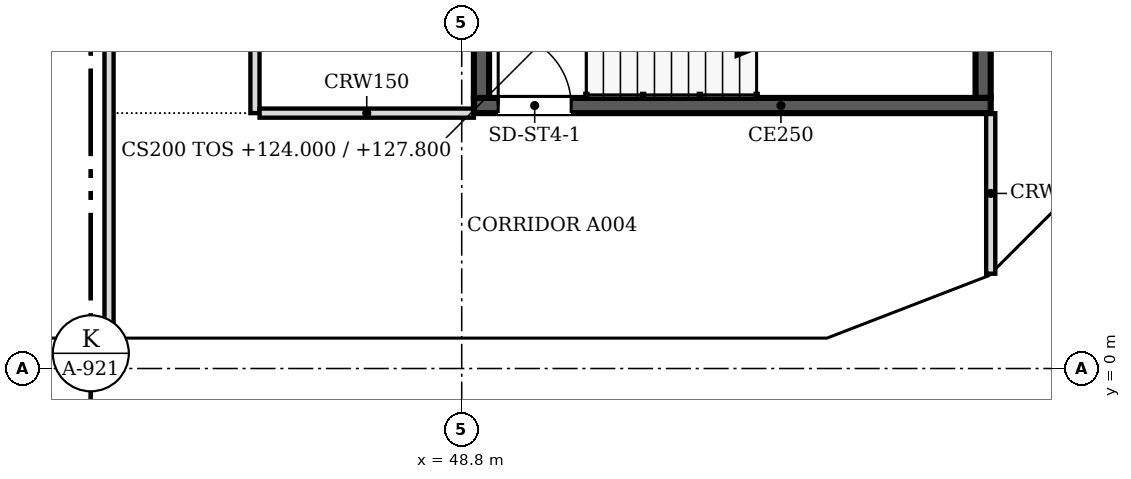
"""IFC4 building model, lengths in metres.
Left out: names, types, materials, properties, quantities, classifications, styles, units other than length and angle.
Written with IfcOpenShell. Run it as: python <this file> out.ifc"""

import sys

from ifc_helpers import new_model, si_unit, direction, frame, frame_2d, origin, place, context, subcontext, project, spatial, polyline, rectangle, outline, extrude, faceted_brep, source, transform, mapped, element, fill, save


model = new_model("IFC4")
c1 = context("Model", 3, precision=1e-05, world=origin(), true_north=direction((0.0, 1.0)))
c2 = subcontext(c1, "Body", "Model", "MODEL_VIEW")
j1 = project(units=[si_unit("LENGTHUNIT", "METRE"), si_unit("PLANEANGLEUNIT", "RADIAN")], contexts=[c1])
p1 = place(None, origin())
s1 = spatial("IfcSite", under=j1, at=p1, CompositionType="ELEMENT")
p2 = place(p1, origin())
s2 = spatial("IfcBuilding", under=s1, at=p2, CompositionType="ELEMENT")
p3 = place(p2, frame((0.0, 0.0, 124.0)))
s3 = spatial("IfcBuildingStorey", under=s2, at=p3, CompositionType="ELEMENT", Elevation=124.0)
m1 = source(origin(), c2, "Body", "Brep", [
    faceted_brep([(3.05, -0.25, 0.0), (6.1, -0.25, 3.8), (6.1, -0.25, 3.8), (3.05, -0.25, 7.6), (0.0, -0.25, 3.8), (0.0, 0.25, 3.8), (3.05, 0.25, 7.6), (6.1, 0.25, 3.8), (6.1, 0.25, 3.8), (3.05, 0.25, 0.0)], [[[0, 1, 2, 3, 4]], [[5, 6, 7, 8, 9]], [[9, 8, 1, 0]], [[7, 6, 3, 2]], [[6, 5, 4, 3]], [[5, 9, 0, 4]], [[1, 8, 7, 2]]]),
])
p4 = place(p3, frame((36.6, 0.25, -3.8), z_axis=(0.0, 0.0, 1.0), x_axis=(1.0, 0.0, 0.0)))
e1 = element("IfcWall", 1, at=p4, inside=s3, PredefinedType="SOLIDWALL", context=c2, shape_type="MappedRepresentation", body=[
    mapped(m1, transform((0.0, 0.0, 0.0), scale=1.0)),
])
m2 = source(origin(), c2, "Body", "SweptSolid", [
    extrude(outline(polyline([(3.05, 0.399), (5.78, 3.8), (3.05, 7.201), (0.321, 3.8), (3.05, 0.399)])), frame((0.0, 0.26, 0.0), z_axis=(0.0, -1.0, 0.0), x_axis=(1.0, 0.0, 0.0)), (0.0, 0.0, 1.0), 0.52),
])
p5 = place(p4, origin())
e2 = element("IfcOpeningElement", 2, at=p5, cuts=e1, PredefinedType="OPENING", context=c2, shape_type="MappedRepresentation", body=[
    mapped(m2, transform((0.0, 0.0, 0.0), scale=1.0)),
])
m3 = source(origin(), c2, "Body", "SweptSolid", [
    extrude(outline(polyline([(3.05, 0.0), (6.1, 3.8), (3.05, 7.6), (0.0, 3.8), (3.05, 0.0)])), frame((0.0, 0.25, 0.0), z_axis=(0.0, -1.0, 0.0), x_axis=(1.0, 0.0, 0.0)), (0.0, 0.0, 1.0), 0.5),
])
p6 = place(p3, frame((42.7, 0.25, -3.8), z_axis=(0.0, 0.0, 1.0), x_axis=(1.0, 0.0, 0.0)))
e3 = element("IfcWall", 3, at=p6, inside=s3, PredefinedType="SOLIDWALL", context=c2, shape_type="MappedRepresentation", body=[
    mapped(m3, transform((0.0, 0.0, 0.0), scale=1.0)),
])
p7 = place(p6, origin())
e4 = element("IfcOpeningElement", 4, at=p7, cuts=e3, PredefinedType="OPENING", context=c2, shape_type="MappedRepresentation", body=[
    mapped(m2, transform((0.0, 0.0, 0.0), scale=1.0)),
])
m4 = source(origin(), c2, "Body", "Brep", [
    faceted_brep([(3.05, -0.25, 0.0), (6.053, -0.25, 3.8), (3.05, -0.25, 7.6), (0.0, -0.25, 3.8), (0.0, 0.25, 3.8), (3.05, 0.25, 7.6), (6.007, 0.25, 3.859), (6.007, 0.25, 3.741), (3.05, 0.25, 0.0), (6.053, 0.0, 3.8)], [[[0, 1, 2, 3]], [[4, 5, 6, 7, 8]], [[8, 7, 9, 1, 0]], [[6, 5, 2, 1, 9]], [[5, 4, 3, 2]], [[4, 8, 0, 3]], [[9, 7, 6]]]),
])
p8 = place(p3, frame((48.8, 0.25, -3.8), z_axis=(0.0, 0.0, 1.0), x_axis=(1.0, 0.0, 0.0)))
e5 = element("IfcWall", 5, at=p8, inside=s3, PredefinedType="SOLIDWALL", context=c2, shape_type="MappedRepresentation", body=[
    mapped(m4, transform((0.0, 0.0, 0.0), scale=1.0)),
])
m5 = source(origin(), c2, "Body", "SweptSolid", [
    extrude(outline(polyline([(3.049, 0.401), (5.735, 3.8), (3.049, 7.199), (0.321, 3.8), (3.049, 0.401)])), frame((0.0, 0.26, 0.0), z_axis=(0.0, -1.0, 0.0), x_axis=(1.0, 0.0, 0.0)), (0.0, 0.0, 1.0), 0.52),
])
p9 = place(p8, origin())
e6 = element("IfcOpeningElement", 6, at=p9, cuts=e5, PredefinedType="OPENING", context=c2, shape_type="MappedRepresentation", body=[
    mapped(m5, transform((0.0, 0.0, 0.0), scale=1.0)),
])
m6 = source(origin(), c2, "Body", "Brep", [
    faceted_brep([(2.95, -0.25, 0.0), (3.003, -0.25, 0.068), (3.003, -0.25, 7.532), (2.95, -0.25, 7.6), (0.0, -0.25, 3.8), (0.047, 0.25, 3.86), (2.898, 0.25, 7.532), (2.898, 0.25, 0.068), (0.047, 0.25, 3.74), (2.95, 0.0, 0.0), (2.95, 0.0, 7.6), (0.0, 0.0, 3.8)], [[[0, 1, 2, 3, 4]], [[5, 6, 7, 8]], [[1, 0, 9]], [[10, 3, 2]], [[6, 5, 11, 4, 3, 10]], [[8, 7, 9, 0, 4, 11]], [[8, 11, 5]], [[1, 9, 7, 6, 10, 2]]]),
])
p10 = place(p3, frame((54.854, 0.25, -3.8), z_axis=(0.0, 0.0, 1.0), x_axis=(0.932970071518, 0.359953949349, 0.0)))
e7 = element("IfcWall", 7, at=p10, inside=s3, PredefinedType="SOLIDWALL", context=c2, shape_type="MappedRepresentation", body=[
    mapped(m6, transform((0.0, 0.0, 0.0), scale=1.0)),
])
m7 = source(origin(), c2, "Body", "SweptSolid", [
    extrude(outline(polyline([(2.75, 6.935), (0.316, 3.8), (2.75, 0.665), (2.75, 6.935)])), frame((0.0, 0.26, 0.0), z_axis=(0.0, -1.0, 0.0), x_axis=(1.0, 0.0, 0.0)), (0.0, 0.0, 1.0), 0.52),
])
p11 = place(p10, origin())
e8 = element("IfcOpeningElement", 8, at=p11, cuts=e7, PredefinedType="OPENING", context=c2, shape_type="MappedRepresentation", body=[
    mapped(m7, transform((0.0, 0.0, 0.0), scale=1.0)),
])
m8 = source(origin(), c2, "Body", "Brep", [
    faceted_brep([(0.053, -0.25, 0.0), (2.997, -0.25, 3.8), (0.053, -0.25, 7.6), (0.0, -0.25, 7.532), (0.0, -0.25, 0.068), (0.106, 0.25, 7.532), (2.944, 0.25, 3.868), (2.944, 0.25, 3.732), (0.106, 0.25, 0.068), (2.997, 0.0, 3.8), (0.053, 0.0, 0.0), (0.053, 0.0, 7.6)], [[[0, 1, 2, 3, 4]], [[5, 6, 7, 8]], [[8, 7, 9, 1, 0, 10]], [[6, 5, 11, 2, 1, 9]], [[3, 2, 11]], [[10, 0, 4]], [[8, 10, 4, 3, 11, 5]], [[9, 7, 6]]]),
])
p12 = place(p3, frame((57.569, 1.274, -3.8), z_axis=(0.0, 0.0, 1.0), x_axis=(0.707066050402, 0.707147509625, 0.0)))
e9 = element("IfcWall", 9, at=p12, inside=s3, PredefinedType="SOLIDWALL", context=c2, shape_type="MappedRepresentation", body=[
    mapped(m8, transform((0.0, 0.0, 0.0), scale=1.0)),
])
m9 = source(origin(), c2, "Body", "SweptSolid", [
    extrude(outline(polyline([(0.253, 0.666), (2.681, 3.8), (0.253, 6.934), (0.253, 0.666)])), frame((0.0, 0.26, 0.0), z_axis=(0.0, -1.0, 0.0), x_axis=(1.0, 0.0, 0.0)), (0.0, 0.0, 1.0), 0.52),
])
p13 = place(p12, origin())
e10 = element("IfcOpeningElement", 10, at=p13, cuts=e9, PredefinedType="OPENING", context=c2, shape_type="MappedRepresentation", body=[
    mapped(m9, transform((0.0, 0.0, 0.0), scale=1.0)),
])
p14 = place(p2, frame((0.0, 0.0, 127.8)))
s4 = spatial("IfcBuildingStorey", under=s2, at=p14, CompositionType="ELEMENT", Elevation=127.8)
p15 = place(p14, frame((39.65, 0.25, -3.8), z_axis=(0.0, 0.0, 1.0), x_axis=(1.0, 0.0, 0.0)))
e11 = element("IfcWall", 11, at=p15, inside=s4, PredefinedType="SOLIDWALL", context=c2, shape_type="MappedRepresentation", body=[
    mapped(m3, transform((0.0, 0.0, 0.0), scale=1.0)),
])
p16 = place(p15, origin())
e12 = element("IfcOpeningElement", 12, at=p16, cuts=e11, PredefinedType="OPENING", context=c2, shape_type="MappedRepresentation", body=[
    mapped(m2, transform((0.0, 0.0, 0.0), scale=1.0)),
])
p17 = place(p14, frame((45.75, 0.25, -3.8), z_axis=(0.0, 0.0, 1.0), x_axis=(1.0, 0.0, 0.0)))
e13 = element("IfcWall", 13, at=p17, inside=s4, PredefinedType="SOLIDWALL", context=c2, shape_type="MappedRepresentation", body=[
    mapped(m3, transform((0.0, 0.0, 0.0), scale=1.0)),
])
p18 = place(p17, origin())
e14 = element("IfcOpeningElement", 14, at=p18, cuts=e13, PredefinedType="OPENING", context=c2, shape_type="MappedRepresentation", body=[
    mapped(m2, transform((0.0, 0.0, 0.0), scale=1.0)),
])
m10 = source(origin(), c2, "Body", "Brep", [
    faceted_brep([(3.003, -0.25, 0.0), (3.05, -0.25, 0.06), (3.05, -0.25, 7.54), (3.003, -0.25, 7.6), (0.0, -0.25, 3.8), (0.0, 0.25, 3.8), (2.957, 0.25, 7.541), (2.957, 0.25, 0.059), (3.003, 0.0, 0.0), (3.003, 0.0, 7.6)], [[[0, 1, 2, 3, 4]], [[5, 6, 7]], [[1, 0, 8]], [[9, 3, 2]], [[6, 5, 4, 3, 9]], [[5, 7, 8, 0, 4]], [[1, 8, 7, 6, 9, 2]]]),
])
p19 = place(p14, frame((51.85, 0.25, -3.8), z_axis=(0.0, 0.0, 1.0), x_axis=(1.0, 0.0, 0.0)))
e15 = element("IfcWall", 15, at=p19, inside=s4, PredefinedType="SOLIDWALL", context=c2, shape_type="MappedRepresentation", body=[
    mapped(m10, transform((0.0, 0.0, 0.0), scale=1.0)),
])
m11 = source(origin(), c2, "Body", "SweptSolid", [
    extrude(outline(polyline([(2.803, 6.944), (0.319, 3.8), (2.803, 0.656), (2.803, 6.944)])), frame((0.0, 0.26, 0.0), z_axis=(0.0, -1.0, 0.0), x_axis=(1.0, 0.0, 0.0)), (0.0, 0.0, 1.0), 0.52),
])
p20 = place(p19, origin())
e16 = element("IfcOpeningElement", 16, at=p20, cuts=e15, PredefinedType="OPENING", context=c2, shape_type="MappedRepresentation", body=[
    mapped(m11, transform((0.0, 0.0, 0.0), scale=1.0)),
])
m12 = source(origin(), c2, "Body", "Brep", [
    faceted_brep([(0.047, -0.25, 0.0), (2.997, -0.25, 3.8), (0.047, -0.25, 7.6), (0.0, -0.25, 7.541), (0.0, -0.25, 0.059), (0.093, 0.25, 7.54), (2.944, 0.25, 3.868), (2.944, 0.25, 3.732), (0.093, 0.25, 0.06), (2.997, 0.0, 3.8), (0.047, 0.0, 0.0), (0.047, 0.0, 7.6)], [[[0, 1, 2, 3, 4]], [[5, 6, 7, 8]], [[8, 7, 9, 1, 0, 10]], [[6, 5, 11, 2, 1, 9]], [[3, 2, 11]], [[10, 0, 4]], [[8, 10, 4, 3, 11, 5]], [[9, 7, 6]]]),
])
p21 = place(p14, frame((54.81, 0.233, -3.8), z_axis=(0.0, 0.0, 1.0), x_axis=(0.932990326376, 0.359901446078, 0.0)))
e17 = element("IfcWall", 17, at=p21, inside=s4, PredefinedType="SOLIDWALL", context=c2, shape_type="MappedRepresentation", body=[
    mapped(m12, transform((0.0, 0.0, 0.0), scale=1.0)),
])
m13 = source(origin(), c2, "Body", "SweptSolid", [
    extrude(outline(polyline([(0.247, 0.665), (2.681, 3.8), (0.247, 6.935), (0.247, 0.665)])), frame((0.0, 0.26, 0.0), z_axis=(0.0, -1.0, 0.0), x_axis=(1.0, 0.0, 0.0)), (0.0, 0.0, 1.0), 0.52),
])
p22 = place(p21, origin())
e18 = element("IfcOpeningElement", 18, at=p22, cuts=e17, PredefinedType="OPENING", context=c2, shape_type="MappedRepresentation", body=[
    mapped(m13, transform((0.0, 0.0, 0.0), scale=1.0)),
])
m14 = source(origin(), c2, "Body", "Brep", [
    faceted_brep([(2.944, -0.25, 0.0), (2.997, -0.25, 0.068), (2.997, -0.25, 7.532), (2.944, -0.25, 7.6), (0.0, -0.25, 3.8), (0.053, 0.25, 3.868), (2.891, 0.25, 7.532), (2.891, 0.25, 0.068), (0.053, 0.25, 3.732), (2.944, 0.0, 0.0), (2.944, 0.0, 7.6), (0.0, 0.0, 3.8)], [[[0, 1, 2, 3, 4]], [[5, 6, 7, 8]], [[1, 0, 9]], [[10, 3, 2]], [[6, 5, 11, 4, 3, 10]], [[8, 7, 9, 0, 4, 11]], [[8, 11, 5]], [[1, 9, 7, 6, 10, 2]]]),
])
p23 = place(p14, frame((57.606, 1.312, -3.8), z_axis=(0.0, 0.0, 1.0), x_axis=(0.707147509625, 0.707066050402, 0.0)))
e19 = element("IfcWall", 19, at=p23, inside=s4, PredefinedType="SOLIDWALL", context=c2, shape_type="MappedRepresentation", body=[
    mapped(m14, transform((0.0, 0.0, 0.0), scale=1.0)),
])
m15 = source(origin(), c2, "Body", "SweptSolid", [
    extrude(outline(polyline([(2.744, 6.934), (0.316, 3.8), (2.744, 0.666), (2.744, 6.934)])), frame((0.0, 0.26, 0.0), z_axis=(0.0, -1.0, 0.0), x_axis=(1.0, 0.0, 0.0)), (0.0, 0.0, 1.0), 0.52),
])
p24 = place(p23, origin())
e20 = element("IfcOpeningElement", 20, at=p24, cuts=e19, PredefinedType="OPENING", context=c2, shape_type="MappedRepresentation", body=[
    mapped(m15, transform((0.0, 0.0, 0.0), scale=1.0)),
])
p25 = place(p3, frame((57.5, 4.325, 0.0), z_axis=(0.0, 0.0, 1.0), x_axis=(-1.0, 0.0, 0.0)))
e21 = element("IfcWall", 21, at=p25, inside=s3, PredefinedType="SOLIDWALL", context=c2, shape_type="SweptSolid", body=[
    extrude(rectangle(XDim=8.5, YDim=0.25, at=frame_2d((4.25, 0.0))), origin(), (0.0, 0.0, 1.0), 3.8),
])
m16 = source(origin(), c2, "Body", "SweptSolid", [
    extrude(rectangle(XDim=1.2, YDim=2.1, at=frame_2d((0.6, 1.05))), frame((0.0, 0.135, 0.0), z_axis=(0.0, -1.0, 0.0), x_axis=(1.0, 0.0, 0.0)), (0.0, 0.0, 1.0), 0.27),
])
p26 = place(p25, frame((6.9, 0.0, 0.0)))
e22 = element("IfcOpeningElement", 22, at=p26, cuts=e21, PredefinedType="OPENING", context=c2, shape_type="MappedRepresentation", body=[
    mapped(m16, transform((0.0, 0.0, 0.0), scale=1.0)),
])
for number, where, z_axis, x_axis in (
    (23, (49.125, 4.45, 0.0), (0.0, 0.0, 1.0), (0.0, 1.0, 0.0)),
    (24, (57.375, 7.85, 0.0), (0.0, 0.0, 1.0), (0.0, -1.0, 0.0)),
):
    element("IfcWall", number, at=place(p3, frame(where, z_axis=z_axis, x_axis=x_axis)), inside=s3, PredefinedType="SOLIDWALL", context=c2, shape_type="SweptSolid", body=[
        extrude(rectangle(XDim=3.4, YDim=0.25, at=frame_2d((1.7, 0.0))), origin(), (0.0, 0.0, 1.0), 3.8),
    ])
p27 = place(p3, frame((43.0, 0.5, 0.0), z_axis=(0.0, 0.0, 1.0), x_axis=(0.0, 1.0, 0.0)))
e25 = element("IfcWall", 25, at=p27, inside=s3, PredefinedType="PARTITIONING", context=c2, shape_type="SweptSolid", body=[
    extrude(rectangle(XDim=21.424, YDim=0.15, at=frame_2d((10.712, 0.0))), origin(), (0.0, 0.0, 1.0), 3.067),
])
m17 = source(origin(), c2, "Body", "SweptSolid", [
    extrude(rectangle(XDim=1.0, YDim=2.1, at=frame_2d((0.5, 1.05))), frame((0.0, 0.085, 0.0), z_axis=(0.0, -1.0, 0.0), x_axis=(1.0, 0.0, 0.0)), (0.0, 0.0, 1.0), 0.17),
])
p28 = place(p27, frame((16.601, 0.0, 0.0)))
e26 = element("IfcOpeningElement", 26, at=p28, cuts=e25, PredefinedType="OPENING", context=c2, shape_type="MappedRepresentation", body=[
    mapped(m17, transform((0.0, 0.0, 0.0), scale=1.0)),
])
p29 = place(p27, frame((7.7, 0.0, 0.0)))
e27 = element("IfcOpeningElement", 27, at=p29, cuts=e25, PredefinedType="OPENING", context=c2, shape_type="MappedRepresentation", body=[
    mapped(m17, transform((0.0, 0.0, 0.0), scale=1.0)),
])
p30 = place(p3, frame((57.5, 1.559, 0.0), z_axis=(0.0, 0.0, 1.0), x_axis=(0.0, 1.0, 0.0)))
e28 = element("IfcWall", 28, at=p30, inside=s3, PredefinedType="PARTITIONING", context=c2, shape_type="SweptSolid", body=[
    extrude(rectangle(XDim=2.641, YDim=0.15, at=frame_2d((1.32, 0.0))), origin(), (0.0, 0.0, 1.0), 3.067),
])
p31 = place(p3, frame((45.4, 22.0, 0.0), z_axis=(0.0, 0.0, 1.0), x_axis=(0.0, -1.0, 0.0)))
e29 = element("IfcWall", 29, at=p31, inside=s3, PredefinedType="PARTITIONING", context=c2, shape_type="SweptSolid", body=[
    extrude(rectangle(XDim=17.8, YDim=0.15, at=frame_2d((8.9, 0.0))), origin(), (0.0, 0.0, 1.0), 3.067),
])
p32 = place(p31, frame((3.499, 0.0, 0.0)))
e30 = element("IfcOpeningElement", 30, at=p32, cuts=e29, PredefinedType="OPENING", context=c2, shape_type="MappedRepresentation", body=[
    mapped(m17, transform((0.0, 0.0, 0.0), scale=1.0)),
])
m18 = source(origin(), c2, "Body", "SweptSolid", [
    extrude(rectangle(XDim=0.9, YDim=2.1, at=frame_2d((0.45, 1.05))), frame((0.0, 0.085, 0.0), z_axis=(0.0, -1.0, 0.0), x_axis=(1.0, 0.0, 0.0)), (0.0, 0.0, 1.0), 0.17),
])
p33 = place(p31, frame((12.4, 0.0, 0.0)))
e31 = element("IfcOpeningElement", 31, at=p33, cuts=e29, PredefinedType="OPENING", context=c2, shape_type="MappedRepresentation", body=[
    mapped(m18, transform((0.0, 0.0, 0.0), scale=1.0)),
])
p34 = place(p3, frame((45.476, 4.2, 0.0), z_axis=(0.0, 0.0, 1.0), x_axis=(1.0, 0.0, 0.0)))
e32 = element("IfcWall", 32, at=p34, inside=s3, PredefinedType="PARTITIONING", context=c2, shape_type="SweptSolid", body=[
    extrude(rectangle(XDim=3.524, YDim=0.15, at=frame_2d((1.762, 0.0))), origin(), (0.0, 0.0, 1.0), 3.067),
])
m19 = source(origin(), c2, "Body", "SweptSolid", [
    extrude(rectangle(XDim=1.2, YDim=2.1, at=frame_2d((0.6, 1.05))), frame((0.0, 0.025, 0.0), z_axis=(0.0, -1.0, 0.0), x_axis=(1.0, 0.0, 0.0)), (0.0, 0.0, 1.0), 0.05),
])
p35 = place(p26, origin())
e33 = element("IfcDoor", 33, at=p35, inside=s3, OperationType="SINGLE_SWING_RIGHT", PredefinedType="DOOR", context=c2, shape_type="MappedRepresentation", body=[
    mapped(m19, transform((0.0, 0.0, 0.0), scale=1.0)),
])
fill(e22, e33)
save(model, sys.argv[1])
